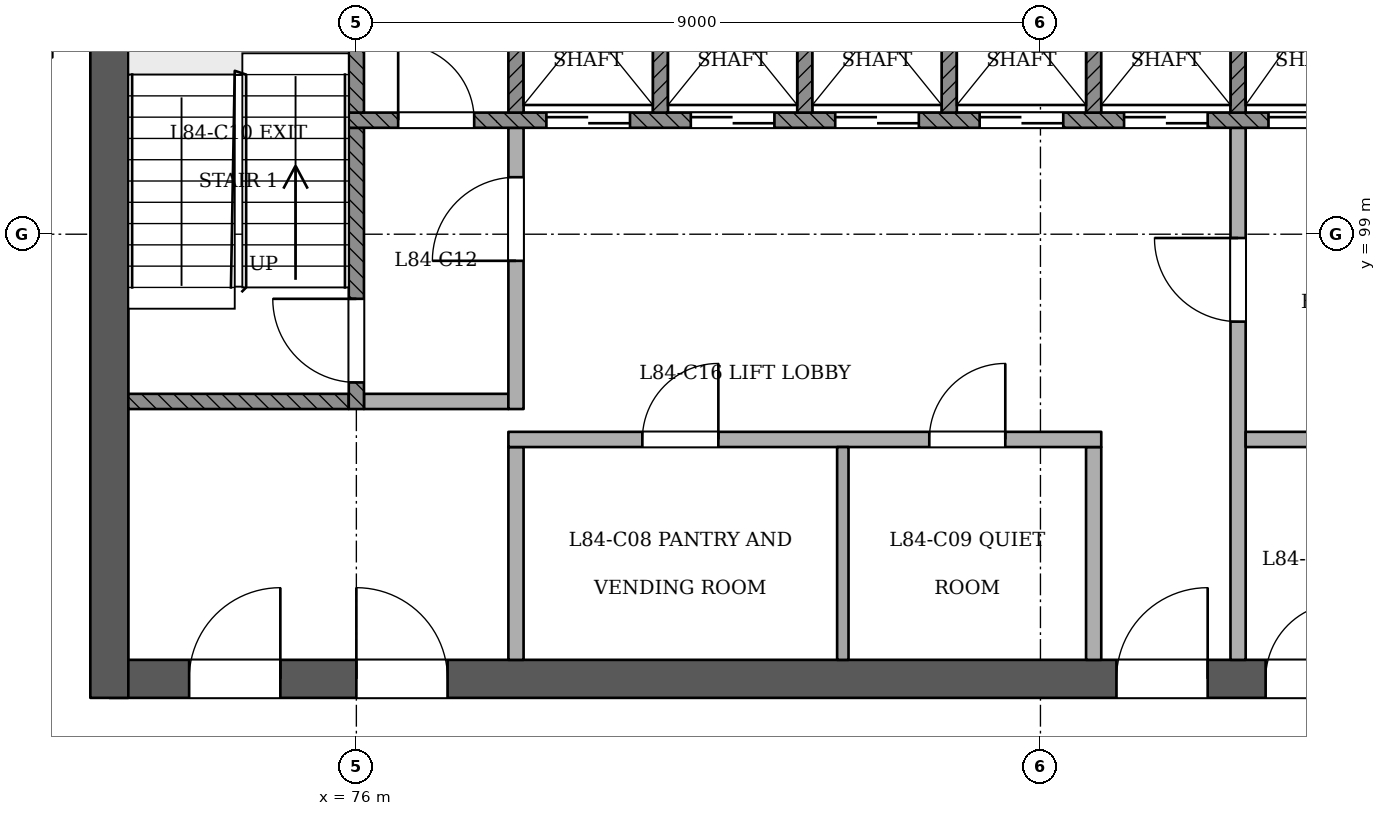
"""IFC4 building model, lengths in metres.
Left out: names, types, materials, properties, quantities, classifications, styles, units other than length and angle.
Written with IfcOpenShell. Run it as: python <this file> out.ifc"""

import sys

from ifc_helpers import new_model, si_unit, direction, frame, frame_2d, origin, place, context, subcontext, project, spatial, rectangle, extrude, element, fill, save


model = new_model("IFC4")
c1 = context("Model", 3, precision=1e-05, world=origin(), true_north=direction((0.0, 1.0)))
c2 = subcontext(c1, "Body", "Model", "MODEL_VIEW")
j1 = project(units=[si_unit("LENGTHUNIT", "METRE"), si_unit("PLANEANGLEUNIT", "RADIAN")], contexts=[c1])
p1 = place(None, origin())
s1 = spatial("IfcSite", under=j1, at=p1, CompositionType="ELEMENT")
p2 = place(p1, origin())
s2 = spatial("IfcBuilding", under=s1, at=p2, CompositionType="ELEMENT")
p3 = place(p2, frame((0.0, 0.0, 323.8)))
s3 = spatial("IfcBuildingStorey", under=s2, at=p3, CompositionType="ELEMENT", Elevation=323.8)
p4 = place(p3, frame((72.75, 93.15, 0.0), z_axis=(0.0, 0.0, 1.0), x_axis=(1.0, 0.0, 0.0)))
e1 = element("IfcWall", 1, at=p4, inside=s3, PredefinedType="SHEAR", context=c2, shape_type="SweptSolid", body=[
    extrude(rectangle(XDim=24.75, YDim=0.5, at=frame_2d((12.375, 0.0))), origin(), (0.0, 0.0, 1.0), 3.6),
])
p5 = place(p4, frame((1.05, 0.0, 0.0)))
e2 = element("IfcOpeningElement", 2, at=p5, cuts=e1, PredefinedType="OPENING", context=c2, shape_type="SweptSolid", body=[
    extrude(rectangle(XDim=1.2, YDim=2.1, at=frame_2d((0.6, 1.05))), frame((0.0, 0.26, 0.0), z_axis=(0.0, -1.0, 0.0), x_axis=(1.0, 0.0, 0.0)), (0.0, 0.0, 1.0), 0.521),
])
p6 = place(p4, frame((3.25, 0.0, 0.0)))
e3 = element("IfcOpeningElement", 3, at=p6, cuts=e1, PredefinedType="OPENING", context=c2, shape_type="SweptSolid", body=[
    extrude(rectangle(XDim=1.2, YDim=2.1, at=frame_2d((0.6, 1.05))), frame((0.0, 0.26, 0.0), z_axis=(0.0, -1.0, 0.0), x_axis=(1.0, 0.0, 0.0)), (0.0, 0.0, 1.0), 0.521),
])
p7 = place(p4, frame((13.25, 0.0, 0.0)))
e4 = element("IfcOpeningElement", 4, at=p7, cuts=e1, PredefinedType="OPENING", context=c2, shape_type="SweptSolid", body=[
    extrude(rectangle(XDim=1.2, YDim=2.1, at=frame_2d((0.6, 1.05))), frame((0.0, 0.26, 0.0), z_axis=(0.0, -1.0, 0.0), x_axis=(1.0, 0.0, 0.0)), (0.0, 0.0, 1.0), 0.521),
])
p8 = place(p4, frame((15.212, 0.0, 0.0)))
e5 = element("IfcOpeningElement", 5, at=p8, cuts=e1, PredefinedType="OPENING", context=c2, shape_type="SweptSolid", body=[
    extrude(rectangle(XDim=1.0, YDim=2.1, at=frame_2d((0.5, 1.05))), frame((0.0, 0.26, 0.0), z_axis=(0.0, -1.0, 0.0), x_axis=(1.0, 0.0, 0.0)), (0.0, 0.0, 1.0), 0.521),
])
p9 = place(p4, frame((18.05, 0.0, 0.0)))
e6 = element("IfcOpeningElement", 6, at=p9, cuts=e1, PredefinedType="OPENING", context=c2, shape_type="SweptSolid", body=[
    extrude(rectangle(XDim=1.0, YDim=2.1, at=frame_2d((0.5, 1.05))), frame((0.0, 0.26, 0.0), z_axis=(0.0, -1.0, 0.0), x_axis=(1.0, 0.0, 0.0)), (0.0, 0.0, 1.0), 0.521),
])
p10 = place(p4, frame((20.95, 0.0, 0.0)))
e7 = element("IfcOpeningElement", 7, at=p10, cuts=e1, PredefinedType="OPENING", context=c2, shape_type="SweptSolid", body=[
    extrude(rectangle(XDim=1.0, YDim=2.1, at=frame_2d((0.5, 1.05))), frame((0.0, 0.26, 0.0), z_axis=(0.0, -1.0, 0.0), x_axis=(1.0, 0.0, 0.0)), (0.0, 0.0, 1.0), 0.521),
])
p11 = place(p4, frame((22.837, 0.0, 0.0)))
e8 = element("IfcOpeningElement", 8, at=p11, cuts=e1, PredefinedType="OPENING", context=c2, shape_type="SweptSolid", body=[
    extrude(rectangle(XDim=1.0, YDim=2.1, at=frame_2d((0.5, 1.05))), frame((0.0, 0.26, 0.0), z_axis=(0.0, -1.0, 0.0), x_axis=(1.0, 0.0, 0.0)), (0.0, 0.0, 1.0), 0.521),
])
p12 = place(p3, frame((72.75, 103.65, 0.0), z_axis=(0.0, 0.0, 1.0), x_axis=(0.0, -1.0, 0.0)))
e9 = element("IfcWall", 9, at=p12, inside=s3, PredefinedType="SHEAR", context=c2, shape_type="SweptSolid", body=[
    extrude(rectangle(XDim=10.75, YDim=0.5, at=frame_2d((5.375, 0.0))), origin(), (0.0, 0.0, 1.0), 3.6),
])
p13 = place(p3, frame((78.1, 93.4, 0.0), z_axis=(0.0, 0.0, 1.0), x_axis=(0.0, 1.0, 0.0)))
e10 = element("IfcWall", 10, at=p13, inside=s3, PredefinedType="PARTITIONING", context=c2, shape_type="SweptSolid", body=[
    extrude(rectangle(XDim=2.8, YDim=0.2, at=frame_2d((1.4, 0.0))), origin(), (0.0, 0.0, 1.0), 3.2),
])
p14 = place(p3, frame((82.4, 93.4, 0.0), z_axis=(0.0, 0.0, 1.0), x_axis=(0.0, 1.0, 0.0)))
e11 = element("IfcWall", 11, at=p14, inside=s3, PredefinedType="PARTITIONING", context=c2, shape_type="SweptSolid", body=[
    extrude(rectangle(XDim=2.8, YDim=0.15, at=frame_2d((1.4, 0.0))), origin(), (0.0, 0.0, 1.0), 3.2),
])
p15 = place(p3, frame((85.7, 93.4, 0.0), z_axis=(0.0, 0.0, 1.0), x_axis=(0.0, 1.0, 0.0)))
e12 = element("IfcWall", 12, at=p15, inside=s3, PredefinedType="PARTITIONING", context=c2, shape_type="SweptSolid", body=[
    extrude(rectangle(XDim=2.8, YDim=0.2, at=frame_2d((1.4, 0.0))), origin(), (0.0, 0.0, 1.0), 3.2),
])
p16 = place(p3, frame((87.6, 93.4, 0.0), z_axis=(0.0, 0.0, 1.0), x_axis=(0.0, 1.0, 0.0)))
e13 = element("IfcWall", 13, at=p16, inside=s3, PredefinedType="PARTITIONING", context=c2, shape_type="SweptSolid", body=[
    extrude(rectangle(XDim=7.0, YDim=0.2, at=frame_2d((3.5, 0.0))), origin(), (0.0, 0.0, 1.0), 3.2),
])
p17 = place(p16, frame((4.45, 0.0, 0.0)))
e14 = element("IfcOpeningElement", 14, at=p17, cuts=e13, PredefinedType="OPENING", context=c2, shape_type="SweptSolid", body=[
    extrude(rectangle(XDim=1.1, YDim=2.1, at=frame_2d((0.55, 1.05))), frame((0.0, 0.11, 0.0), z_axis=(0.0, -1.0, 0.0), x_axis=(1.0, 0.0, 0.0)), (0.0, 0.0, 1.0), 0.221),
])
p18 = place(p3, frame((78.0, 96.3, 0.0), z_axis=(0.0, 0.0, 1.0), x_axis=(1.0, 0.0, 0.0)))
e15 = element("IfcWall", 15, at=p18, inside=s3, PredefinedType="PARTITIONING", context=c2, shape_type="SweptSolid", body=[
    extrude(rectangle(XDim=7.8, YDim=0.2, at=frame_2d((3.9, 0.0))), origin(), (0.0, 0.0, 1.0), 3.2),
])
p19 = place(p18, frame((1.762, 0.0, 0.0)))
e16 = element("IfcOpeningElement", 16, at=p19, cuts=e15, PredefinedType="OPENING", context=c2, shape_type="SweptSolid", body=[
    extrude(rectangle(XDim=1.0, YDim=2.1, at=frame_2d((0.5, 1.05))), frame((0.0, 0.11, 0.0), z_axis=(0.0, -1.0, 0.0), x_axis=(1.0, 0.0, 0.0)), (0.0, 0.0, 1.0), 0.221),
])
p20 = place(p18, frame((5.538, 0.0, 0.0)))
e17 = element("IfcOpeningElement", 17, at=p20, cuts=e15, PredefinedType="OPENING", context=c2, shape_type="SweptSolid", body=[
    extrude(rectangle(XDim=1.0, YDim=2.1, at=frame_2d((0.5, 1.05))), frame((0.0, 0.11, 0.0), z_axis=(0.0, -1.0, 0.0), x_axis=(1.0, 0.0, 0.0)), (0.0, 0.0, 1.0), 0.221),
])
p21 = place(p3, frame((87.7, 96.3, 0.0), z_axis=(0.0, 0.0, 1.0), x_axis=(1.0, 0.0, 0.0)))
e18 = element("IfcWall", 18, at=p21, inside=s3, PredefinedType="PARTITIONING", context=c2, shape_type="SweptSolid", body=[
    extrude(rectangle(XDim=3.6, YDim=0.2, at=frame_2d((1.8, 0.0))), origin(), (0.0, 0.0, 1.0), 3.2),
])
p22 = place(p3, frame((73.0, 96.8, 0.0), z_axis=(0.0, 0.0, 1.0), x_axis=(1.0, 0.0, 0.0)))
e19 = element("IfcWall", 19, at=p22, inside=s3, PredefinedType="SOLIDWALL", context=c2, shape_type="SweptSolid", body=[
    extrude(rectangle(XDim=2.9, YDim=0.2, at=frame_2d((1.45, 0.0))), origin(), (0.0, 0.0, 1.0), 3.2),
])
p23 = place(p3, frame((76.0, 96.7, 0.0), z_axis=(0.0, 0.0, 1.0), x_axis=(0.0, 1.0, 0.0)))
e20 = element("IfcWall", 20, at=p23, inside=s3, PredefinedType="SOLIDWALL", context=c2, shape_type="SweptSolid", body=[
    extrude(rectangle(XDim=3.7, YDim=0.2, at=frame_2d((1.85, 0.0))), origin(), (0.0, 0.0, 1.0), 3.2),
])
p24 = place(p23, frame((0.35, 0.0, 0.0)))
e21 = element("IfcOpeningElement", 21, at=p24, cuts=e20, PredefinedType="OPENING", context=c2, shape_type="SweptSolid", body=[
    extrude(rectangle(XDim=1.1, YDim=2.1, at=frame_2d((0.55, 1.05))), frame((0.0, 0.11, 0.0), z_axis=(0.0, -1.0, 0.0), x_axis=(1.0, 0.0, 0.0)), (0.0, 0.0, 1.0), 0.221),
])
p25 = place(p3, frame((76.1, 96.8, 0.0), z_axis=(0.0, 0.0, 1.0), x_axis=(1.0, 0.0, 0.0)))
e22 = element("IfcWall", 22, at=p25, inside=s3, PredefinedType="PARTITIONING", context=c2, shape_type="SweptSolid", body=[
    extrude(rectangle(XDim=1.9, YDim=0.2, at=frame_2d((0.95, 0.0))), origin(), (0.0, 0.0, 1.0), 3.2),
])
p26 = place(p3, frame((78.1, 96.7, 0.0), z_axis=(0.0, 0.0, 1.0), x_axis=(0.0, 1.0, 0.0)))
e23 = element("IfcWall", 23, at=p26, inside=s3, PredefinedType="PARTITIONING", context=c2, shape_type="SweptSolid", body=[
    extrude(rectangle(XDim=3.7, YDim=0.2, at=frame_2d((1.85, 0.0))), origin(), (0.0, 0.0, 1.0), 3.2),
])
p27 = place(p26, frame((1.95, 0.0, 0.0)))
e24 = element("IfcOpeningElement", 24, at=p27, cuts=e23, PredefinedType="OPENING", context=c2, shape_type="SweptSolid", body=[
    extrude(rectangle(XDim=1.1, YDim=2.1, at=frame_2d((0.55, 1.05))), frame((0.0, 0.11, 0.0), z_axis=(0.0, -1.0, 0.0), x_axis=(1.0, 0.0, 0.0)), (0.0, 0.0, 1.0), 0.221),
])
p28 = place(p3, frame((75.9, 100.5, 0.0), z_axis=(0.0, 0.0, 1.0), x_axis=(1.0, 0.0, 0.0)))
e25 = element("IfcWall", 25, at=p28, inside=s3, PredefinedType="SOLIDWALL", context=c2, shape_type="SweptSolid", body=[
    extrude(rectangle(XDim=18.2, YDim=0.2, at=frame_2d((9.1, 0.0))), origin(), (0.0, 0.0, 1.0), 3.2),
])
p29 = place(p28, frame((2.6, 0.0, 0.0)))
e26 = element("IfcOpeningElement", 26, at=p29, cuts=e25, PredefinedType="OPENING", context=c2, shape_type="SweptSolid", body=[
    extrude(rectangle(XDim=1.1, YDim=2.1, at=frame_2d((0.55, 1.05))), frame((0.0, 0.11, 0.0), z_axis=(0.0, -1.0, 0.0), x_axis=(1.0, 0.0, 0.0)), (0.0, 0.0, 1.0), 0.221),
])
p30 = place(p28, frame((4.5, 0.0, 0.0)))
e27 = element("IfcOpeningElement", 27, at=p30, cuts=e25, PredefinedType="OPENING", context=c2, shape_type="SweptSolid", body=[
    extrude(rectangle(XDim=1.1, YDim=2.1, at=frame_2d((0.55, 1.05))), frame((0.0, 0.11, 0.0), z_axis=(0.0, -1.0, 0.0), x_axis=(1.0, 0.0, 0.0)), (0.0, 0.0, 1.0), 0.221),
])
p31 = place(p28, frame((6.4, 0.0, 0.0)))
e28 = element("IfcOpeningElement", 28, at=p31, cuts=e25, PredefinedType="OPENING", context=c2, shape_type="SweptSolid", body=[
    extrude(rectangle(XDim=1.1, YDim=2.1, at=frame_2d((0.55, 1.05))), frame((0.0, 0.11, 0.0), z_axis=(0.0, -1.0, 0.0), x_axis=(1.0, 0.0, 0.0)), (0.0, 0.0, 1.0), 0.221),
])
p32 = place(p28, frame((8.3, 0.0, 0.0)))
e29 = element("IfcOpeningElement", 29, at=p32, cuts=e25, PredefinedType="OPENING", context=c2, shape_type="SweptSolid", body=[
    extrude(rectangle(XDim=1.1, YDim=2.1, at=frame_2d((0.55, 1.05))), frame((0.0, 0.11, 0.0), z_axis=(0.0, -1.0, 0.0), x_axis=(1.0, 0.0, 0.0)), (0.0, 0.0, 1.0), 0.221),
])
p33 = place(p28, frame((10.2, 0.0, 0.0)))
e30 = element("IfcOpeningElement", 30, at=p33, cuts=e25, PredefinedType="OPENING", context=c2, shape_type="SweptSolid", body=[
    extrude(rectangle(XDim=1.1, YDim=2.1, at=frame_2d((0.55, 1.05))), frame((0.0, 0.11, 0.0), z_axis=(0.0, -1.0, 0.0), x_axis=(1.0, 0.0, 0.0)), (0.0, 0.0, 1.0), 0.221),
])
p34 = place(p28, frame((12.1, 0.0, 0.0)))
e31 = element("IfcOpeningElement", 31, at=p34, cuts=e25, PredefinedType="OPENING", context=c2, shape_type="SweptSolid", body=[
    extrude(rectangle(XDim=1.1, YDim=2.1, at=frame_2d((0.55, 1.05))), frame((0.0, 0.11, 0.0), z_axis=(0.0, -1.0, 0.0), x_axis=(1.0, 0.0, 0.0)), (0.0, 0.0, 1.0), 0.221),
])
p35 = place(p28, frame((14.0, 0.0, 0.0)))
e32 = element("IfcOpeningElement", 32, at=p35, cuts=e25, PredefinedType="OPENING", context=c2, shape_type="SweptSolid", body=[
    extrude(rectangle(XDim=1.1, YDim=2.1, at=frame_2d((0.55, 1.05))), frame((0.0, 0.11, 0.0), z_axis=(0.0, -1.0, 0.0), x_axis=(1.0, 0.0, 0.0)), (0.0, 0.0, 1.0), 0.221),
])
p36 = place(p28, frame((0.65, 0.0, 0.0)))
e33 = element("IfcOpeningElement", 33, at=p36, cuts=e25, PredefinedType="OPENING", context=c2, shape_type="SweptSolid", body=[
    extrude(rectangle(XDim=1.0, YDim=2.1, at=frame_2d((0.5, 1.05))), frame((0.0, 0.11, 0.0), z_axis=(0.0, -1.0, 0.0), x_axis=(1.0, 0.0, 0.0)), (0.0, 0.0, 1.0), 0.221),
])
p37 = place(p28, frame((16.3, 0.0, 0.0)))
e34 = element("IfcOpeningElement", 34, at=p37, cuts=e25, PredefinedType="OPENING", context=c2, shape_type="SweptSolid", body=[
    extrude(rectangle(XDim=1.0, YDim=2.1, at=frame_2d((0.5, 1.05))), frame((0.0, 0.11, 0.0), z_axis=(0.0, -1.0, 0.0), x_axis=(1.0, 0.0, 0.0)), (0.0, 0.0, 1.0), 0.221),
])
for number, where, z_axis, x_axis in (
    (35, (76.0, 100.6, 0.0), (0.0, 0.0, 1.0), (0.0, 1.0, 0.0)),
    (36, (78.1, 100.6, 0.0), (0.0, 0.0, 1.0), (0.0, 1.0, 0.0)),
    (37, (80.0, 100.6, 0.0), (0.0, 0.0, 1.0), (0.0, 1.0, 0.0)),
    (38, (81.9, 100.6, 0.0), (0.0, 0.0, 1.0), (0.0, 1.0, 0.0)),
    (39, (83.8, 100.6, 0.0), (0.0, 0.0, 1.0), (0.0, 1.0, 0.0)),
    (40, (85.7, 100.6, 0.0), (0.0, 0.0, 1.0), (0.0, 1.0, 0.0)),
    (41, (87.6, 100.6, 0.0), (0.0, 0.0, 1.0), (0.0, 1.0, 0.0)),
):
    element("IfcWall", number, at=place(p3, frame(where, z_axis=z_axis, x_axis=x_axis)), inside=s3, PredefinedType="SOLIDWALL", context=c2, shape_type="SweptSolid", body=[
        extrude(rectangle(XDim=2.8, YDim=0.2, at=frame_2d((1.4, 0.0))), origin(), (0.0, 0.0, 1.0), 3.2),
    ])
p38 = place(p29, origin())
e42 = element("IfcDoor", 42, at=p38, inside=s3, OperationType="SLIDING_TO_RIGHT", PredefinedType="NOTDEFINED", context=c2, shape_type="SweptSolid", body=[
    extrude(rectangle(XDim=1.1, YDim=2.1, at=frame_2d((0.55, 1.05))), frame((0.0, 0.025, 0.0), z_axis=(0.0, -1.0, 0.0), x_axis=(1.0, 0.0, 0.0)), (0.0, 0.0, 1.0), 0.05),
])
fill(e26, e42)
p39 = place(p30, origin())
e43 = element("IfcDoor", 43, at=p39, inside=s3, OperationType="SLIDING_TO_LEFT", PredefinedType="NOTDEFINED", context=c2, shape_type="SweptSolid", body=[
    extrude(rectangle(XDim=1.1, YDim=2.1, at=frame_2d((0.55, 1.05))), frame((0.0, 0.025, 0.0), z_axis=(0.0, -1.0, 0.0), x_axis=(1.0, 0.0, 0.0)), (0.0, 0.0, 1.0), 0.05),
])
fill(e27, e43)
p40 = place(p31, origin())
e44 = element("IfcDoor", 44, at=p40, inside=s3, OperationType="SLIDING_TO_RIGHT", PredefinedType="NOTDEFINED", context=c2, shape_type="SweptSolid", body=[
    extrude(rectangle(XDim=1.1, YDim=2.1, at=frame_2d((0.55, 1.05))), frame((0.0, 0.025, 0.0), z_axis=(0.0, -1.0, 0.0), x_axis=(1.0, 0.0, 0.0)), (0.0, 0.0, 1.0), 0.05),
])
fill(e28, e44)
p41 = place(p32, origin())
e45 = element("IfcDoor", 45, at=p41, inside=s3, OperationType="SLIDING_TO_LEFT", PredefinedType="NOTDEFINED", context=c2, shape_type="SweptSolid", body=[
    extrude(rectangle(XDim=1.1, YDim=2.1, at=frame_2d((0.55, 1.05))), frame((0.0, 0.025, 0.0), z_axis=(0.0, -1.0, 0.0), x_axis=(1.0, 0.0, 0.0)), (0.0, 0.0, 1.0), 0.05),
])
fill(e29, e45)
p42 = place(p33, origin())
e46 = element("IfcDoor", 46, at=p42, inside=s3, OperationType="SLIDING_TO_RIGHT", PredefinedType="NOTDEFINED", context=c2, shape_type="SweptSolid", body=[
    extrude(rectangle(XDim=1.1, YDim=2.1, at=frame_2d((0.55, 1.05))), frame((0.0, 0.025, 0.0), z_axis=(0.0, -1.0, 0.0), x_axis=(1.0, 0.0, 0.0)), (0.0, 0.0, 1.0), 0.05),
])
fill(e30, e46)
p43 = place(p34, origin())
e47 = element("IfcDoor", 47, at=p43, inside=s3, OperationType="SLIDING_TO_RIGHT", PredefinedType="NOTDEFINED", context=c2, shape_type="SweptSolid", body=[
    extrude(rectangle(XDim=1.1, YDim=2.1, at=frame_2d((0.55, 1.05))), frame((0.0, 0.025, 0.0), z_axis=(0.0, -1.0, 0.0), x_axis=(1.0, 0.0, 0.0)), (0.0, 0.0, 1.0), 0.05),
])
fill(e31, e47)
p44 = place(p24, origin())
e48 = element("IfcDoor", 48, at=p44, inside=s3, OperationType="SINGLE_SWING_RIGHT", PredefinedType="NOTDEFINED", context=c2, shape_type="SweptSolid", body=[
    extrude(rectangle(XDim=1.1, YDim=2.1, at=frame_2d((0.55, 1.05))), frame((0.0, 0.025, 0.0), z_axis=(0.0, -1.0, 0.0), x_axis=(1.0, 0.0, 0.0)), (0.0, 0.0, 1.0), 0.05),
])
fill(e21, e48)
p45 = place(p27, origin())
e49 = element("IfcDoor", 49, at=p45, inside=s3, OperationType="SINGLE_SWING_LEFT", PredefinedType="NOTDEFINED", context=c2, shape_type="SweptSolid", body=[
    extrude(rectangle(XDim=1.1, YDim=2.1, at=frame_2d((0.55, 1.05))), frame((0.0, 0.025, 0.0), z_axis=(0.0, -1.0, 0.0), x_axis=(1.0, 0.0, 0.0)), (0.0, 0.0, 1.0), 0.05),
])
fill(e24, e49)
p46 = place(p17, origin())
e50 = element("IfcDoor", 50, at=p46, inside=s3, OperationType="SINGLE_SWING_RIGHT", PredefinedType="NOTDEFINED", context=c2, shape_type="SweptSolid", body=[
    extrude(rectangle(XDim=1.1, YDim=2.1, at=frame_2d((0.55, 1.05))), frame((0.0, 0.025, 0.0), z_axis=(0.0, -1.0, 0.0), x_axis=(1.0, 0.0, 0.0)), (0.0, 0.0, 1.0), 0.05),
])
fill(e14, e50)
p47 = place(p5, origin())
e51 = element("IfcDoor", 51, at=p47, inside=s3, OperationType="SINGLE_SWING_RIGHT", PredefinedType="NOTDEFINED", context=c2, shape_type="SweptSolid", body=[
    extrude(rectangle(XDim=1.2, YDim=2.1, at=frame_2d((0.6, 1.05))), frame((0.0, 0.025, 0.0), z_axis=(0.0, -1.0, 0.0), x_axis=(1.0, 0.0, 0.0)), (0.0, 0.0, 1.0), 0.05),
])
fill(e2, e51)
p48 = place(p6, origin())
e52 = element("IfcDoor", 52, at=p48, inside=s3, OperationType="SINGLE_SWING_LEFT", PredefinedType="NOTDEFINED", context=c2, shape_type="SweptSolid", body=[
    extrude(rectangle(XDim=1.2, YDim=2.1, at=frame_2d((0.6, 1.05))), frame((0.0, 0.025, 0.0), z_axis=(0.0, -1.0, 0.0), x_axis=(1.0, 0.0, 0.0)), (0.0, 0.0, 1.0), 0.05),
])
fill(e3, e52)
p49 = place(p7, origin())
e53 = element("IfcDoor", 53, at=p49, inside=s3, OperationType="SINGLE_SWING_RIGHT", PredefinedType="NOTDEFINED", context=c2, shape_type="SweptSolid", body=[
    extrude(rectangle(XDim=1.2, YDim=2.1, at=frame_2d((0.6, 1.05))), frame((0.0, 0.025, 0.0), z_axis=(0.0, -1.0, 0.0), x_axis=(1.0, 0.0, 0.0)), (0.0, 0.0, 1.0), 0.05),
])
fill(e4, e53)
p50 = place(p36, origin())
e54 = element("IfcDoor", 54, at=p50, inside=s3, OperationType="SINGLE_SWING_LEFT", PredefinedType="NOTDEFINED", context=c2, shape_type="SweptSolid", body=[
    extrude(rectangle(XDim=1.0, YDim=2.1, at=frame_2d((0.5, 1.05))), frame((0.0, 0.025, 0.0), z_axis=(0.0, -1.0, 0.0), x_axis=(1.0, 0.0, 0.0)), (0.0, 0.0, 1.0), 0.05),
])
fill(e33, e54)
p51 = place(p8, origin())
e55 = element("IfcDoor", 55, at=p51, inside=s3, OperationType="SINGLE_SWING_RIGHT", PredefinedType="NOTDEFINED", context=c2, shape_type="SweptSolid", body=[
    extrude(rectangle(XDim=1.0, YDim=2.1, at=frame_2d((0.5, 1.05))), frame((0.0, 0.025, 0.0), z_axis=(0.0, -1.0, 0.0), x_axis=(1.0, 0.0, 0.0)), (0.0, 0.0, 1.0), 0.05),
])
fill(e5, e55)
p52 = place(p19, origin())
e56 = element("IfcDoor", 56, at=p52, inside=s3, OperationType="SINGLE_SWING_RIGHT", PredefinedType="NOTDEFINED", context=c2, shape_type="SweptSolid", body=[
    extrude(rectangle(XDim=1.0, YDim=2.1, at=frame_2d((0.5, 1.05))), frame((0.0, 0.025, 0.0), z_axis=(0.0, -1.0, 0.0), x_axis=(1.0, 0.0, 0.0)), (0.0, 0.0, 1.0), 0.05),
])
fill(e16, e56)
p53 = place(p20, origin())
e57 = element("IfcDoor", 57, at=p53, inside=s3, OperationType="SINGLE_SWING_RIGHT", PredefinedType="NOTDEFINED", context=c2, shape_type="SweptSolid", body=[
    extrude(rectangle(XDim=1.0, YDim=2.1, at=frame_2d((0.5, 1.05))), frame((0.0, 0.025, 0.0), z_axis=(0.0, -1.0, 0.0), x_axis=(1.0, 0.0, 0.0)), (0.0, 0.0, 1.0), 0.05),
])
fill(e17, e57)
save(model, sys.argv[1])
